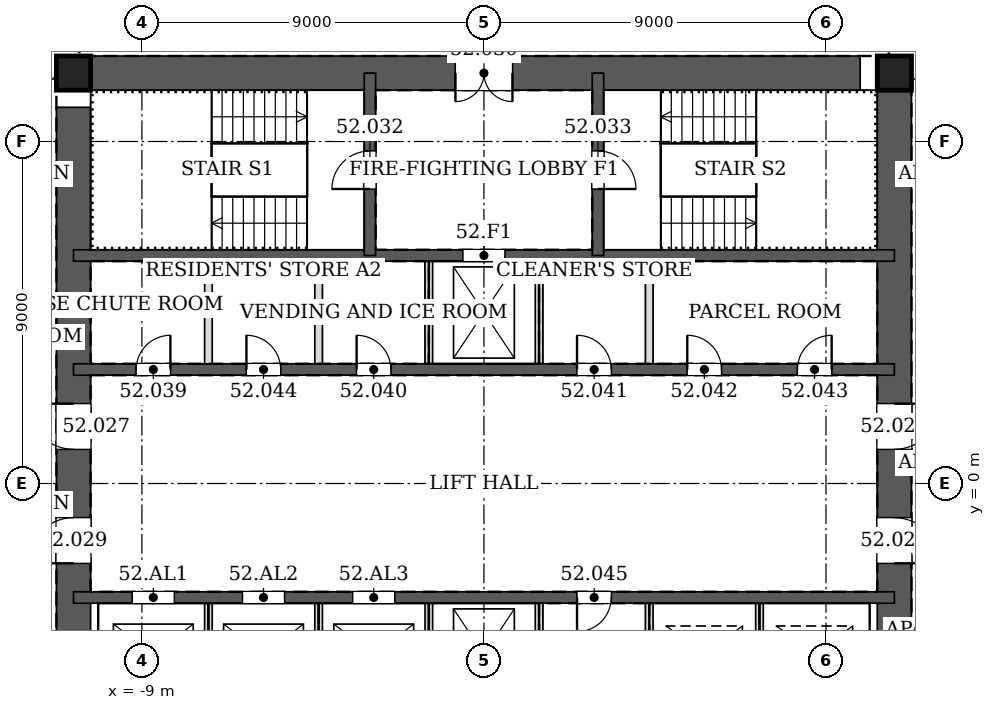
"""IFC4 building model, lengths in metres.
Left out: names, types, materials, properties, quantities, classifications, styles, units other than length and angle.
Written with IfcOpenShell. Run it as: python <this file> out.ifc"""

import sys

from ifc_helpers import new_model, si_unit, direction, frame, frame_2d, origin, origin_2d, place, context, subcontext, project, spatial, rectangle, hollow_rectangle, extrude, element, fill, save


model = new_model("IFC4")
c1 = context("Model", 3, precision=1e-05, world=origin(), true_north=direction((0.0, 1.0)))
c2 = subcontext(c1, "Body", "Model", "MODEL_VIEW")
j1 = project(units=[si_unit("LENGTHUNIT", "METRE"), si_unit("PLANEANGLEUNIT", "RADIAN")], contexts=[c1])
p1 = place(None, origin())
s1 = spatial("IfcSite", under=j1, at=p1, CompositionType="ELEMENT")
p2 = place(p1, origin())
s2 = spatial("IfcBuilding", under=s1, at=p2, CompositionType="ELEMENT")
p3 = place(p2, frame((0.0, 0.0, 224.4)))
s3 = spatial("IfcBuildingStorey", under=s2, at=p3, CompositionType="ELEMENT", Elevation=224.4)
for number, where, z_axis, x_axis in (
    (1, (10.8, 10.8, 0.0), (0.0, 0.0, 1.0), (1.0, 0.0, 0.0)),
    (2, (-10.8, 10.8, 0.0), (0.0, 0.0, 1.0), (1.0, 0.0, 0.0)),
):
    element("IfcColumn", number, at=place(p3, frame(where, z_axis=z_axis, x_axis=x_axis)), inside=s3, PredefinedType="COLUMN", context=c2, shape_type="SweptSolid", body=[
        extrude(hollow_rectangle(XDim=0.9, YDim=0.9, WallThickness=0.05, at=origin_2d()), origin(), (0.0, 0.0, 1.0), 3.4),
    ])
p4 = place(p3, frame((10.8, -10.8, 0.0), z_axis=(0.0, 0.0, 1.0), x_axis=(0.0, 1.0, 0.0)))
e3 = element("IfcWall", 3, at=p4, inside=s3, PredefinedType="SOLIDWALL", context=c2, shape_type="SweptSolid", body=[
    extrude(rectangle(XDim=21.6, YDim=0.9, at=frame_2d((10.8, 0.0))), origin(), (0.0, 0.0, 1.0), 3.4),
])
p5 = place(p4, frame((11.7, 0.0, 0.0)))
e4 = element("IfcOpeningElement", 4, at=p5, cuts=e3, PredefinedType="OPENING", context=c2, shape_type="SweptSolid", body=[
    extrude(rectangle(XDim=1.2, YDim=2.1, at=frame_2d((0.6, 1.05))), frame((0.0, 0.46, 0.0), z_axis=(0.0, -1.0, 0.0), x_axis=(1.0, 0.0, 0.0)), (0.0, 0.0, 1.0), 0.92),
])
p6 = place(p4, frame((8.7, 0.0, 0.0)))
e5 = element("IfcOpeningElement", 5, at=p6, cuts=e3, PredefinedType="OPENING", context=c2, shape_type="SweptSolid", body=[
    extrude(rectangle(XDim=1.2, YDim=2.1, at=frame_2d((0.6, 1.05))), frame((0.0, 0.46, 0.0), z_axis=(0.0, -1.0, 0.0), x_axis=(1.0, 0.0, 0.0)), (0.0, 0.0, 1.0), 0.92),
])
p7 = place(p3, frame((10.8, 10.8, 0.0), z_axis=(0.0, 0.0, 1.0), x_axis=(-1.0, 0.0, 0.0)))
e6 = element("IfcWall", 6, at=p7, inside=s3, PredefinedType="SOLIDWALL", context=c2, shape_type="SweptSolid", body=[
    extrude(rectangle(XDim=21.6, YDim=0.9, at=frame_2d((10.8, 0.0))), origin(), (0.0, 0.0, 1.0), 3.4),
])
p8 = place(p7, frame((10.05, 0.0, 0.0)))
e7 = element("IfcOpeningElement", 7, at=p8, cuts=e6, PredefinedType="OPENING", context=c2, shape_type="SweptSolid", body=[
    extrude(rectangle(XDim=1.5, YDim=2.1, at=frame_2d((0.75, 1.05))), frame((0.0, 0.46, 0.0), z_axis=(0.0, -1.0, 0.0), x_axis=(1.0, 0.0, 0.0)), (0.0, 0.0, 1.0), 0.92),
])
p9 = place(p3, frame((-10.8, 10.8, 0.0), z_axis=(0.0, 0.0, 1.0), x_axis=(0.0, -1.0, 0.0)))
e8 = element("IfcWall", 8, at=p9, inside=s3, PredefinedType="SOLIDWALL", context=c2, shape_type="SweptSolid", body=[
    extrude(rectangle(XDim=21.6, YDim=0.9, at=frame_2d((10.8, 0.0))), origin(), (0.0, 0.0, 1.0), 3.4),
])
p10 = place(p9, frame((8.7, 0.0, 0.0)))
e9 = element("IfcOpeningElement", 9, at=p10, cuts=e8, PredefinedType="OPENING", context=c2, shape_type="SweptSolid", body=[
    extrude(rectangle(XDim=1.2, YDim=2.1, at=frame_2d((0.6, 1.05))), frame((0.0, 0.46, 0.0), z_axis=(0.0, -1.0, 0.0), x_axis=(1.0, 0.0, 0.0)), (0.0, 0.0, 1.0), 0.92),
])
p11 = place(p9, frame((11.7, 0.0, 0.0)))
e10 = element("IfcOpeningElement", 10, at=p11, cuts=e8, PredefinedType="OPENING", context=c2, shape_type="SweptSolid", body=[
    extrude(rectangle(XDim=1.2, YDim=2.1, at=frame_2d((0.6, 1.05))), frame((0.0, 0.46, 0.0), z_axis=(0.0, -1.0, 0.0), x_axis=(1.0, 0.0, 0.0)), (0.0, 0.0, 1.0), 0.92),
])
p12 = place(p3, frame((-10.8, 3.0, 0.0), z_axis=(0.0, 0.0, 1.0), x_axis=(1.0, 0.0, 0.0)))
e11 = element("IfcWall", 11, at=p12, inside=s3, PredefinedType="SOLIDWALL", context=c2, shape_type="SweptSolid", body=[
    extrude(rectangle(XDim=21.6, YDim=0.3, at=frame_2d((10.8, 0.0))), origin(), (0.0, 0.0, 1.0), 3.4),
])
p13 = place(p12, frame((1.65, 0.0, 0.0)))
e12 = element("IfcOpeningElement", 12, at=p13, cuts=e11, PredefinedType="OPENING", context=c2, shape_type="SweptSolid", body=[
    extrude(rectangle(XDim=0.9, YDim=2.1, at=frame_2d((0.45, 1.05))), frame((0.0, 0.16, 0.0), z_axis=(0.0, -1.0, 0.0), x_axis=(1.0, 0.0, 0.0)), (0.0, 0.0, 1.0), 0.32),
])
p14 = place(p12, frame((7.45, 0.0, 0.0)))
e13 = element("IfcOpeningElement", 13, at=p14, cuts=e11, PredefinedType="OPENING", context=c2, shape_type="SweptSolid", body=[
    extrude(rectangle(XDim=0.9, YDim=2.1, at=frame_2d((0.45, 1.05))), frame((0.0, 0.16, 0.0), z_axis=(0.0, -1.0, 0.0), x_axis=(1.0, 0.0, 0.0)), (0.0, 0.0, 1.0), 0.32),
])
p15 = place(p12, frame((13.25, 0.0, 0.0)))
e14 = element("IfcOpeningElement", 14, at=p15, cuts=e11, PredefinedType="OPENING", context=c2, shape_type="SweptSolid", body=[
    extrude(rectangle(XDim=0.9, YDim=2.1, at=frame_2d((0.45, 1.05))), frame((0.0, 0.16, 0.0), z_axis=(0.0, -1.0, 0.0), x_axis=(1.0, 0.0, 0.0)), (0.0, 0.0, 1.0), 0.32),
])
p16 = place(p12, frame((16.15, 0.0, 0.0)))
e15 = element("IfcOpeningElement", 15, at=p16, cuts=e11, PredefinedType="OPENING", context=c2, shape_type="SweptSolid", body=[
    extrude(rectangle(XDim=0.9, YDim=2.1, at=frame_2d((0.45, 1.05))), frame((0.0, 0.16, 0.0), z_axis=(0.0, -1.0, 0.0), x_axis=(1.0, 0.0, 0.0)), (0.0, 0.0, 1.0), 0.32),
])
p17 = place(p12, frame((19.05, 0.0, 0.0)))
e16 = element("IfcOpeningElement", 16, at=p17, cuts=e11, PredefinedType="OPENING", context=c2, shape_type="SweptSolid", body=[
    extrude(rectangle(XDim=0.9, YDim=2.1, at=frame_2d((0.45, 1.05))), frame((0.0, 0.16, 0.0), z_axis=(0.0, -1.0, 0.0), x_axis=(1.0, 0.0, 0.0)), (0.0, 0.0, 1.0), 0.32),
])
p18 = place(p12, frame((4.55, 0.0, 0.0)))
e17 = element("IfcOpeningElement", 17, at=p18, cuts=e11, PredefinedType="OPENING", context=c2, shape_type="SweptSolid", body=[
    extrude(rectangle(XDim=0.9, YDim=2.1, at=frame_2d((0.45, 1.05))), frame((0.0, 0.16, 0.0), z_axis=(0.0, -1.0, 0.0), x_axis=(1.0, 0.0, 0.0)), (0.0, 0.0, 1.0), 0.32),
])
p19 = place(p3, frame((-10.8, 6.0, 0.0), z_axis=(0.0, 0.0, 1.0), x_axis=(1.0, 0.0, 0.0)))
e18 = element("IfcWall", 18, at=p19, inside=s3, PredefinedType="SOLIDWALL", context=c2, shape_type="SweptSolid", body=[
    extrude(rectangle(XDim=21.6, YDim=0.3, at=frame_2d((10.8, 0.0))), origin(), (0.0, 0.0, 1.0), 3.4),
])
p20 = place(p19, frame((10.25, 0.0, 0.0)))
e19 = element("IfcOpeningElement", 19, at=p20, cuts=e18, PredefinedType="OPENING", context=c2, shape_type="SweptSolid", body=[
    extrude(rectangle(XDim=1.1, YDim=2.1, at=frame_2d((0.55, 1.05))), frame((0.0, 0.16, 0.0), z_axis=(0.0, -1.0, 0.0), x_axis=(1.0, 0.0, 0.0)), (0.0, 0.0, 1.0), 0.32),
])
p21 = place(p3, frame((-3.0, 6.0, 0.0), z_axis=(0.0, 0.0, 1.0), x_axis=(0.0, 1.0, 0.0)))
e20 = element("IfcWall", 20, at=p21, inside=s3, PredefinedType="SOLIDWALL", context=c2, shape_type="SweptSolid", body=[
    extrude(rectangle(XDim=4.8, YDim=0.3, at=frame_2d((2.4, 0.0))), origin(), (0.0, 0.0, 1.0), 3.4),
])
p22 = place(p21, frame((1.75, 0.0, 0.0)))
e21 = element("IfcOpeningElement", 21, at=p22, cuts=e20, PredefinedType="OPENING", context=c2, shape_type="SweptSolid", body=[
    extrude(rectangle(XDim=1.0, YDim=2.1, at=frame_2d((0.5, 1.05))), frame((0.0, 0.16, 0.0), z_axis=(0.0, -1.0, 0.0), x_axis=(1.0, 0.0, 0.0)), (0.0, 0.0, 1.0), 0.32),
])
p23 = place(p3, frame((3.0, 6.0, 0.0), z_axis=(0.0, 0.0, 1.0), x_axis=(0.0, 1.0, 0.0)))
e22 = element("IfcWall", 22, at=p23, inside=s3, PredefinedType="SOLIDWALL", context=c2, shape_type="SweptSolid", body=[
    extrude(rectangle(XDim=4.8, YDim=0.3, at=frame_2d((2.4, 0.0))), origin(), (0.0, 0.0, 1.0), 3.4),
])
p24 = place(p23, frame((1.75, 0.0, 0.0)))
e23 = element("IfcOpeningElement", 23, at=p24, cuts=e22, PredefinedType="OPENING", context=c2, shape_type="SweptSolid", body=[
    extrude(rectangle(XDim=1.0, YDim=2.1, at=frame_2d((0.5, 1.05))), frame((0.0, 0.16, 0.0), z_axis=(0.0, -1.0, 0.0), x_axis=(1.0, 0.0, 0.0)), (0.0, 0.0, 1.0), 0.32),
])
p25 = place(p3, frame((-10.8, -3.0, 0.0), z_axis=(0.0, 0.0, 1.0), x_axis=(1.0, 0.0, 0.0)))
e24 = element("IfcWall", 24, at=p25, inside=s3, PredefinedType="SOLIDWALL", context=c2, shape_type="SweptSolid", body=[
    extrude(rectangle(XDim=21.6, YDim=0.3, at=frame_2d((10.8, 0.0))), origin(), (0.0, 0.0, 1.0), 3.4),
])
p26 = place(p25, frame((13.25, 0.0, 0.0)))
e25 = element("IfcOpeningElement", 25, at=p26, cuts=e24, PredefinedType="OPENING", context=c2, shape_type="SweptSolid", body=[
    extrude(rectangle(XDim=0.9, YDim=2.1, at=frame_2d((0.45, 1.05))), frame((0.0, 0.16, 0.0), z_axis=(0.0, -1.0, 0.0), x_axis=(1.0, 0.0, 0.0)), (0.0, 0.0, 1.0), 0.32),
])
p27 = place(p25, frame((1.55, 0.0, 0.0)))
e26 = element("IfcOpeningElement", 26, at=p27, cuts=e24, PredefinedType="OPENING", context=c2, shape_type="SweptSolid", body=[
    extrude(rectangle(XDim=1.1, YDim=2.1, at=frame_2d((0.55, 1.05))), frame((0.0, 0.16, 0.0), z_axis=(0.0, -1.0, 0.0), x_axis=(1.0, 0.0, 0.0)), (0.0, 0.0, 1.0), 0.32),
])
p28 = place(p25, frame((4.45, 0.0, 0.0)))
e27 = element("IfcOpeningElement", 27, at=p28, cuts=e24, PredefinedType="OPENING", context=c2, shape_type="SweptSolid", body=[
    extrude(rectangle(XDim=1.1, YDim=2.1, at=frame_2d((0.55, 1.05))), frame((0.0, 0.16, 0.0), z_axis=(0.0, -1.0, 0.0), x_axis=(1.0, 0.0, 0.0)), (0.0, 0.0, 1.0), 0.32),
])
p29 = place(p25, frame((7.35, 0.0, 0.0)))
e28 = element("IfcOpeningElement", 28, at=p29, cuts=e24, PredefinedType="OPENING", context=c2, shape_type="SweptSolid", body=[
    extrude(rectangle(XDim=1.1, YDim=2.1, at=frame_2d((0.55, 1.05))), frame((0.0, 0.16, 0.0), z_axis=(0.0, -1.0, 0.0), x_axis=(1.0, 0.0, 0.0)), (0.0, 0.0, 1.0), 0.32),
])
for number, where, z_axis, x_axis in (
    (29, (-7.25, 3.15, 0.0), (0.0, 0.0, 1.0), (0.0, 1.0, 0.0)),
    (30, (-4.35, 3.15, 0.0), (0.0, 0.0, 1.0), (0.0, 1.0, 0.0)),
    (31, (-1.45, 3.15, 0.0), (0.0, 0.0, 1.0), (0.0, 1.0, 0.0)),
    (32, (1.45, 3.15, 0.0), (0.0, 0.0, 1.0), (0.0, 1.0, 0.0)),
    (33, (4.35, 3.15, 0.0), (0.0, 0.0, 1.0), (0.0, 1.0, 0.0)),
):
    element("IfcWall", number, at=place(p3, frame(where, z_axis=z_axis, x_axis=x_axis)), inside=s3, PredefinedType="PARTITIONING", context=c2, shape_type="SweptSolid", body=[
        extrude(rectangle(XDim=2.7, YDim=0.2, at=frame_2d((1.35, 0.0))), origin(), (0.0, 0.0, 1.0), 3.2),
    ])
for number, where, z_axis, x_axis in (
    (34, (-7.25, -5.85, 0.0), (0.0, 0.0, 1.0), (0.0, 1.0, 0.0)),
    (35, (-4.35, -5.85, 0.0), (0.0, 0.0, 1.0), (0.0, 1.0, 0.0)),
    (36, (-1.45, -5.85, 0.0), (0.0, 0.0, 1.0), (0.0, 1.0, 0.0)),
):
    element("IfcWall", number, at=place(p3, frame(where, z_axis=z_axis, x_axis=x_axis)), inside=s3, PredefinedType="PARTITIONING", context=c2, shape_type="SweptSolid", body=[
        extrude(rectangle(XDim=2.7, YDim=0.2, at=frame_2d((1.35, 0.0))), origin(), (0.0, 0.0, 1.0), 3.4),
    ])
for number, where, z_axis, x_axis in (
    (37, (1.45, -5.85, 0.0), (0.0, 0.0, 1.0), (0.0, 1.0, 0.0)),
    (38, (4.35, -5.85, 0.0), (0.0, 0.0, 1.0), (0.0, 1.0, 0.0)),
):
    element("IfcWall", number, at=place(p3, frame(where, z_axis=z_axis, x_axis=x_axis)), inside=s3, PredefinedType="PARTITIONING", context=c2, shape_type="SweptSolid", body=[
        extrude(rectangle(XDim=2.7, YDim=0.2, at=frame_2d((1.35, 0.0))), origin(), (0.0, 0.0, 1.0), 3.2),
    ])
p30 = place(p3, frame((7.25, -5.85, 0.0), z_axis=(0.0, 0.0, 1.0), x_axis=(0.0, 1.0, 0.0)))
e39 = element("IfcWall", 39, at=p30, inside=s3, PredefinedType="PARTITIONING", context=c2, shape_type="SweptSolid", body=[
    extrude(rectangle(XDim=2.7, YDim=0.2, at=frame_2d((1.35, 0.0))), origin(), (0.0, 0.0, 1.0), 3.4),
])
p31 = place(p5, frame((1.2, 0.0, 0.0), z_axis=(0.0, 0.0, 1.0), x_axis=(-1.0, 0.0, 0.0)))
e40 = element("IfcDoor", 40, at=p31, inside=s3, OperationType="SINGLE_SWING_LEFT", PredefinedType="DOOR", context=c2, shape_type="SweptSolid", body=[
    extrude(rectangle(XDim=1.2, YDim=2.1, at=frame_2d((0.6, 1.05))), frame((0.0, 0.025, 0.0), z_axis=(0.0, -1.0, 0.0), x_axis=(1.0, 0.0, 0.0)), (0.0, 0.0, 1.0), 0.05),
])
fill(e4, e40)
p32 = place(p10, frame((1.2, 0.0, 0.0), z_axis=(0.0, 0.0, 1.0), x_axis=(-1.0, 0.0, 0.0)))
e41 = element("IfcDoor", 41, at=p32, inside=s3, OperationType="SINGLE_SWING_RIGHT", PredefinedType="DOOR", context=c2, shape_type="SweptSolid", body=[
    extrude(rectangle(XDim=1.2, YDim=2.1, at=frame_2d((0.6, 1.05))), frame((0.0, 0.025, 0.0), z_axis=(0.0, -1.0, 0.0), x_axis=(1.0, 0.0, 0.0)), (0.0, 0.0, 1.0), 0.05),
])
fill(e9, e41)
p33 = place(p6, frame((1.2, 0.0, 0.0), z_axis=(0.0, 0.0, 1.0), x_axis=(-1.0, 0.0, 0.0)))
e42 = element("IfcDoor", 42, at=p33, inside=s3, OperationType="SINGLE_SWING_RIGHT", PredefinedType="DOOR", context=c2, shape_type="SweptSolid", body=[
    extrude(rectangle(XDim=1.2, YDim=2.1, at=frame_2d((0.6, 1.05))), frame((0.0, 0.025, 0.0), z_axis=(0.0, -1.0, 0.0), x_axis=(1.0, 0.0, 0.0)), (0.0, 0.0, 1.0), 0.05),
])
fill(e5, e42)
p34 = place(p11, frame((1.2, 0.0, 0.0), z_axis=(0.0, 0.0, 1.0), x_axis=(-1.0, 0.0, 0.0)))
e43 = element("IfcDoor", 43, at=p34, inside=s3, OperationType="SINGLE_SWING_LEFT", PredefinedType="DOOR", context=c2, shape_type="SweptSolid", body=[
    extrude(rectangle(XDim=1.2, YDim=2.1, at=frame_2d((0.6, 1.05))), frame((0.0, 0.025, 0.0), z_axis=(0.0, -1.0, 0.0), x_axis=(1.0, 0.0, 0.0)), (0.0, 0.0, 1.0), 0.05),
])
fill(e10, e43)
p35 = place(p8, origin())
e44 = element("IfcDoor", 44, at=p35, inside=s3, OperationType="DOUBLE_DOOR_SINGLE_SWING", PredefinedType="DOOR", context=c2, shape_type="SweptSolid", body=[
    extrude(rectangle(XDim=1.5, YDim=2.1, at=frame_2d((0.75, 1.05))), frame((0.0, 0.025, 0.0), z_axis=(0.0, -1.0, 0.0), x_axis=(1.0, 0.0, 0.0)), (0.0, 0.0, 1.0), 0.05),
])
fill(e7, e44)
p36 = place(p22, origin())
e45 = element("IfcDoor", 45, at=p36, inside=s3, OperationType="SINGLE_SWING_LEFT", PredefinedType="DOOR", context=c2, shape_type="SweptSolid", body=[
    extrude(rectangle(XDim=1.0, YDim=2.1, at=frame_2d((0.5, 1.05))), frame((0.0, 0.025, 0.0), z_axis=(0.0, -1.0, 0.0), x_axis=(1.0, 0.0, 0.0)), (0.0, 0.0, 1.0), 0.05),
])
fill(e21, e45)
p37 = place(p24, frame((1.0, 0.0, 0.0), z_axis=(0.0, 0.0, 1.0), x_axis=(-1.0, 0.0, 0.0)))
e46 = element("IfcDoor", 46, at=p37, inside=s3, OperationType="SINGLE_SWING_RIGHT", PredefinedType="DOOR", context=c2, shape_type="SweptSolid", body=[
    extrude(rectangle(XDim=1.0, YDim=2.1, at=frame_2d((0.5, 1.05))), frame((0.0, 0.025, 0.0), z_axis=(0.0, -1.0, 0.0), x_axis=(1.0, 0.0, 0.0)), (0.0, 0.0, 1.0), 0.05),
])
fill(e23, e46)
p38 = place(p13, origin())
e47 = element("IfcDoor", 47, at=p38, inside=s3, OperationType="SINGLE_SWING_RIGHT", PredefinedType="DOOR", context=c2, shape_type="SweptSolid", body=[
    extrude(rectangle(XDim=0.9, YDim=2.1, at=frame_2d((0.45, 1.05))), frame((0.0, 0.025, 0.0), z_axis=(0.0, -1.0, 0.0), x_axis=(1.0, 0.0, 0.0)), (0.0, 0.0, 1.0), 0.05),
])
fill(e12, e47)
p39 = place(p14, origin())
e48 = element("IfcDoor", 48, at=p39, inside=s3, OperationType="SINGLE_SWING_LEFT", PredefinedType="DOOR", context=c2, shape_type="SweptSolid", body=[
    extrude(rectangle(XDim=0.9, YDim=2.1, at=frame_2d((0.45, 1.05))), frame((0.0, 0.025, 0.0), z_axis=(0.0, -1.0, 0.0), x_axis=(1.0, 0.0, 0.0)), (0.0, 0.0, 1.0), 0.05),
])
fill(e13, e48)
p40 = place(p15, origin())
e49 = element("IfcDoor", 49, at=p40, inside=s3, OperationType="SINGLE_SWING_LEFT", PredefinedType="DOOR", context=c2, shape_type="SweptSolid", body=[
    extrude(rectangle(XDim=0.9, YDim=2.1, at=frame_2d((0.45, 1.05))), frame((0.0, 0.025, 0.0), z_axis=(0.0, -1.0, 0.0), x_axis=(1.0, 0.0, 0.0)), (0.0, 0.0, 1.0), 0.05),
])
fill(e14, e49)
p41 = place(p16, origin())
e50 = element("IfcDoor", 50, at=p41, inside=s3, OperationType="SINGLE_SWING_LEFT", PredefinedType="DOOR", context=c2, shape_type="SweptSolid", body=[
    extrude(rectangle(XDim=0.9, YDim=2.1, at=frame_2d((0.45, 1.05))), frame((0.0, 0.025, 0.0), z_axis=(0.0, -1.0, 0.0), x_axis=(1.0, 0.0, 0.0)), (0.0, 0.0, 1.0), 0.05),
])
fill(e15, e50)
p42 = place(p17, origin())
e51 = element("IfcDoor", 51, at=p42, inside=s3, OperationType="SINGLE_SWING_RIGHT", PredefinedType="DOOR", context=c2, shape_type="SweptSolid", body=[
    extrude(rectangle(XDim=0.9, YDim=2.1, at=frame_2d((0.45, 1.05))), frame((0.0, 0.025, 0.0), z_axis=(0.0, -1.0, 0.0), x_axis=(1.0, 0.0, 0.0)), (0.0, 0.0, 1.0), 0.05),
])
fill(e16, e51)
p43 = place(p18, origin())
e52 = element("IfcDoor", 52, at=p43, inside=s3, OperationType="SINGLE_SWING_LEFT", PredefinedType="DOOR", context=c2, shape_type="SweptSolid", body=[
    extrude(rectangle(XDim=0.9, YDim=2.1, at=frame_2d((0.45, 1.05))), frame((0.0, 0.025, 0.0), z_axis=(0.0, -1.0, 0.0), x_axis=(1.0, 0.0, 0.0)), (0.0, 0.0, 1.0), 0.05),
])
fill(e17, e52)
p44 = place(p26, frame((0.9, 0.0, 0.0), z_axis=(0.0, 0.0, 1.0), x_axis=(-1.0, 0.0, 0.0)))
e53 = element("IfcDoor", 53, at=p44, inside=s3, OperationType="SINGLE_SWING_RIGHT", PredefinedType="DOOR", context=c2, shape_type="SweptSolid", body=[
    extrude(rectangle(XDim=0.9, YDim=2.1, at=frame_2d((0.45, 1.05))), frame((0.0, 0.025, 0.0), z_axis=(0.0, -1.0, 0.0), x_axis=(1.0, 0.0, 0.0)), (0.0, 0.0, 1.0), 0.05),
])
fill(e25, e53)
p45 = place(p20, origin())
e54 = element("IfcDoor", 54, at=p45, inside=s3, OperationType="DOUBLE_DOOR_SLIDING", PredefinedType="DOOR", context=c2, shape_type="SweptSolid", body=[
    extrude(rectangle(XDim=1.1, YDim=2.1, at=frame_2d((0.55, 1.05))), frame((0.0, 0.025, 0.0), z_axis=(0.0, -1.0, 0.0), x_axis=(1.0, 0.0, 0.0)), (0.0, 0.0, 1.0), 0.05),
])
fill(e19, e54)
p46 = place(p27, origin())
e55 = element("IfcDoor", 55, at=p46, inside=s3, OperationType="DOUBLE_DOOR_SLIDING", PredefinedType="DOOR", context=c2, shape_type="SweptSolid", body=[
    extrude(rectangle(XDim=1.1, YDim=2.1, at=frame_2d((0.55, 1.05))), frame((0.0, 0.025, 0.0), z_axis=(0.0, -1.0, 0.0), x_axis=(1.0, 0.0, 0.0)), (0.0, 0.0, 1.0), 0.05),
])
fill(e26, e55)
p47 = place(p28, origin())
e56 = element("IfcDoor", 56, at=p47, inside=s3, OperationType="DOUBLE_DOOR_SLIDING", PredefinedType="DOOR", context=c2, shape_type="SweptSolid", body=[
    extrude(rectangle(XDim=1.1, YDim=2.1, at=frame_2d((0.55, 1.05))), frame((0.0, 0.025, 0.0), z_axis=(0.0, -1.0, 0.0), x_axis=(1.0, 0.0, 0.0)), (0.0, 0.0, 1.0), 0.05),
])
fill(e27, e56)
p48 = place(p29, origin())
e57 = element("IfcDoor", 57, at=p48, inside=s3, OperationType="DOUBLE_DOOR_SLIDING", PredefinedType="DOOR", context=c2, shape_type="SweptSolid", body=[
    extrude(rectangle(XDim=1.1, YDim=2.1, at=frame_2d((0.55, 1.05))), frame((0.0, 0.025, 0.0), z_axis=(0.0, -1.0, 0.0), x_axis=(1.0, 0.0, 0.0)), (0.0, 0.0, 1.0), 0.05),
])
fill(e28, e57)
save(model, sys.argv[1])
